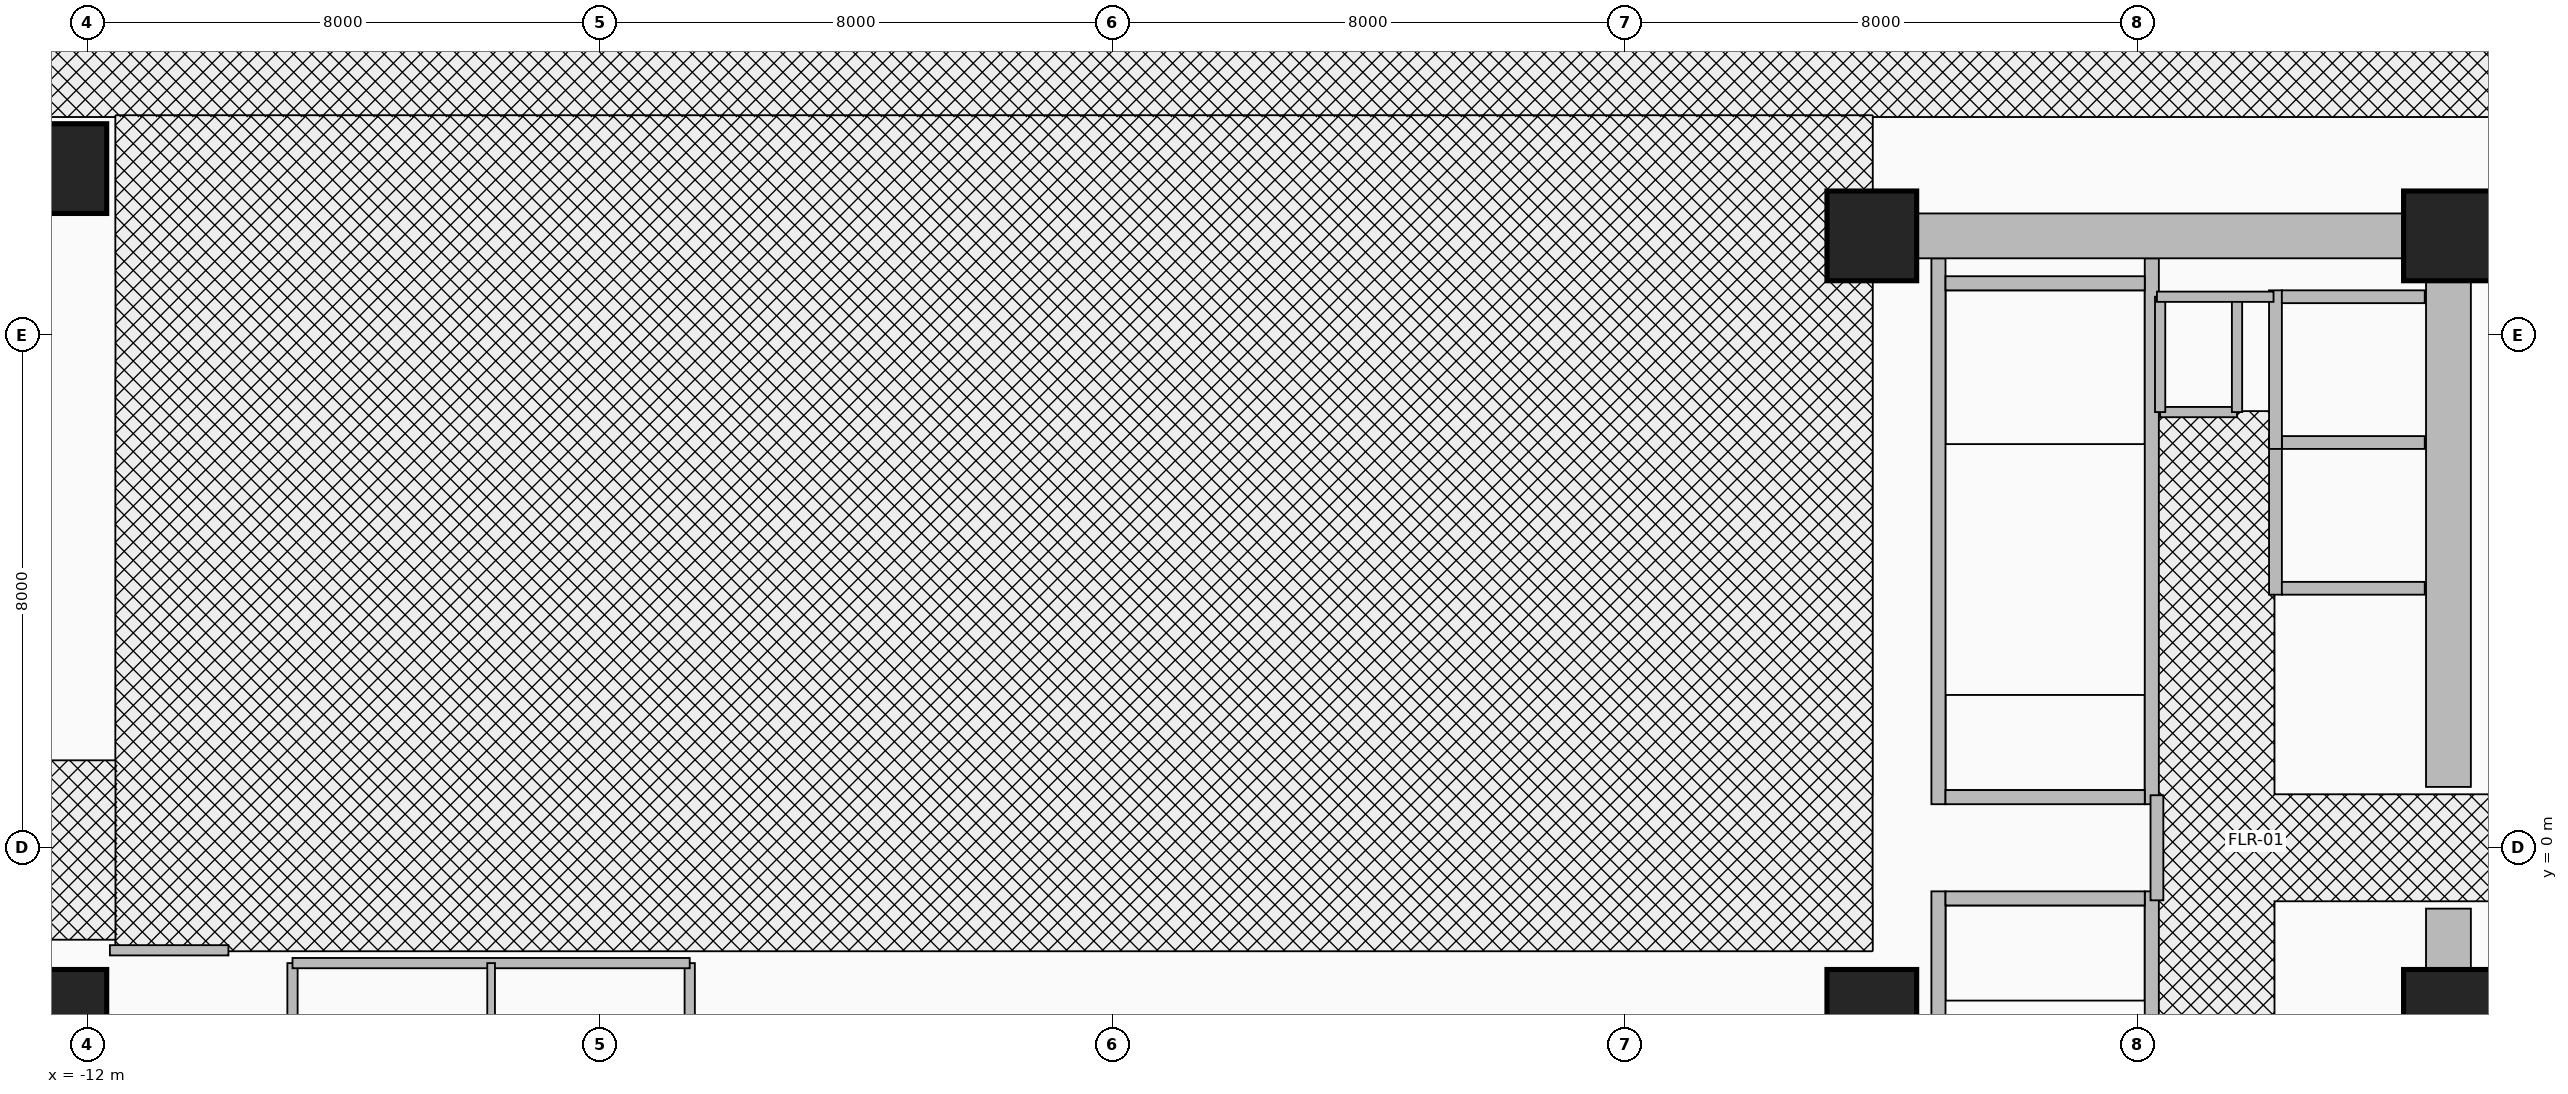
"""IFC4 building model, lengths in metres.
Left out: names, types, materials, properties, quantities, classifications, styles, units other than length and angle.
Written with IfcOpenShell. Run it as: python <this file> out.ifc"""

import sys

from ifc_helpers import new_model, si_unit, direction, frame, frame_2d, origin, origin_2d, place, context, subcontext, project, spatial, rectangle, extrude, source, transform, mapped, element, fill, save


model = new_model("IFC4")
c1 = context("Model", 3, precision=1e-05, world=origin(), true_north=direction((0.0, 1.0)))
c2 = subcontext(c1, "Body", "Model", "MODEL_VIEW")
j1 = project(units=[si_unit("LENGTHUNIT", "METRE"), si_unit("PLANEANGLEUNIT", "RADIAN")], contexts=[c1])
p1 = place(None, origin())
s1 = spatial("IfcSite", under=j1, at=p1, CompositionType="ELEMENT")
p2 = place(p1, origin())
s2 = spatial("IfcBuilding", under=s1, at=p2, CompositionType="ELEMENT")
p3 = place(p2, frame((0.0, 0.0, 5.2)))
s3 = spatial("IfcBuildingStorey", under=s2, at=p3, CompositionType="ELEMENT", Elevation=5.2)
for number, where, z_axis, x_axis in (
    (1, (16.89, 0.68, 0.0), (0.0, 0.0, 1.0), (0.0, 1.0, 0.0)),
    (2, (20.22, 0.68, 0.0), (0.0, 0.0, 1.0), (0.0, 1.0, 0.0)),
):
    element("IfcWall", number, at=place(p3, frame(where, z_axis=z_axis, x_axis=x_axis)), inside=s3, PredefinedType="SHEAR", context=c2, shape_type="SweptSolid", body=[
        extrude(rectangle(XDim=8.52, YDim=0.22, at=frame_2d((4.26, 0.0))), origin(), (0.0, 0.0, 1.0), 4.92),
    ])
p4 = place(p3, frame((17.0, 0.79, 0.0), z_axis=(0.0, 0.0, 1.0), x_axis=(1.0, 0.0, 0.0)))
e3 = element("IfcWall", 3, at=p4, inside=s3, PredefinedType="SHEAR", context=c2, shape_type="SweptSolid", body=[
    extrude(rectangle(XDim=3.11, YDim=0.22, at=frame_2d((1.555, 0.0))), origin(), (0.0, 0.0, 1.0), 4.92),
])
p5 = place(p4, frame((0.95, 0.0, 0.0)))
e4 = element("IfcOpeningElement", 4, at=p5, cuts=e3, PredefinedType="OPENING", context=c2, shape_type="SweptSolid", body=[
    extrude(rectangle(XDim=1.1, YDim=2.15, at=frame_2d((0.55, 1.075))), frame((0.0, 0.125, 0.0), z_axis=(0.0, -1.0, 0.0), x_axis=(1.0, 0.0, 0.0)), (0.0, 0.0, 1.0), 0.25),
])
p6 = place(p3, frame((17.0, 8.81, 0.0), z_axis=(0.0, 0.0, 1.0), x_axis=(1.0, 0.0, 0.0)))
e5 = element("IfcWall", 5, at=p6, inside=s3, PredefinedType="SHEAR", context=c2, shape_type="SweptSolid", body=[
    extrude(rectangle(XDim=3.11, YDim=0.22, at=frame_2d((1.555, 0.0))), origin(), (0.0, 0.0, 1.0), 4.92),
])
for number, where, z_axis, x_axis in (
    (6, (16.89, -9.2, 0.0), (0.0, 0.0, 1.0), (0.0, 1.0, 0.0)),
    (7, (20.22, -9.2, 0.0), (0.0, 0.0, 1.0), (0.0, 1.0, 0.0)),
):
    element("IfcWall", number, at=place(p3, frame(where, z_axis=z_axis, x_axis=x_axis)), inside=s3, PredefinedType="SHEAR", context=c2, shape_type="SweptSolid", body=[
        extrude(rectangle(XDim=8.52, YDim=0.22, at=frame_2d((4.26, 0.0))), origin(), (0.0, 0.0, 1.0), 4.92),
    ])
p7 = place(p3, frame((17.0, -0.79, 0.0), z_axis=(0.0, 0.0, 1.0), x_axis=(1.0, 0.0, 0.0)))
e8 = element("IfcWall", 8, at=p7, inside=s3, PredefinedType="SHEAR", context=c2, shape_type="SweptSolid", body=[
    extrude(rectangle(XDim=3.11, YDim=0.22, at=frame_2d((1.555, 0.0))), origin(), (0.0, 0.0, 1.0), 4.92),
])
p8 = place(p7, frame((0.95, 0.0, 0.0)))
e9 = element("IfcOpeningElement", 9, at=p8, cuts=e8, PredefinedType="OPENING", context=c2, shape_type="SweptSolid", body=[
    extrude(rectangle(XDim=1.1, YDim=2.15, at=frame_2d((0.55, 1.075))), frame((0.0, 0.125, 0.0), z_axis=(0.0, -1.0, 0.0), x_axis=(1.0, 0.0, 0.0)), (0.0, 0.0, 1.0), 0.25),
])
p9 = place(p3, frame((-22.65, 10.8, 0.0), z_axis=(0.0, 0.0, 1.0), x_axis=(1.0, 0.0, 0.0)))
e10 = element("IfcWall", 10, at=p9, inside=s3, PredefinedType="SHEAR", context=c2, shape_type="SweptSolid", body=[
    extrude(rectangle(XDim=10.25, YDim=0.7, at=frame_2d((5.125, 0.0))), origin(), (0.0, 0.0, 1.0), 4.92),
])
for number, where, z_axis, x_axis in (
    (11, (24.85, -9.9, 0.0), (0.0, 0.0, 1.0), (0.0, 1.0, 0.0)),
    (12, (24.85, 0.95, 0.0), (0.0, 0.0, 1.0), (0.0, 1.0, 0.0)),
):
    element("IfcWall", number, at=place(p3, frame(where, z_axis=z_axis, x_axis=x_axis)), inside=s3, PredefinedType="SHEAR", context=c2, shape_type="SweptSolid", body=[
        extrude(rectangle(XDim=8.95, YDim=0.7, at=frame_2d((4.475, 0.0))), origin(), (0.0, 0.0, 1.0), 4.92),
    ])
p10 = place(p3, frame((15.85, 9.55, 0.0), z_axis=(0.0, 0.0, 1.0), x_axis=(1.0, 0.0, 0.0)))
e13 = element("IfcWall", 13, at=p10, inside=s3, PredefinedType="SHEAR", context=c2, shape_type="SweptSolid", body=[
    extrude(rectangle(XDim=9.0, YDim=0.7, at=frame_2d((4.5, 0.0))), origin(), (0.0, 0.0, 1.0), 4.92),
])
m1 = source(origin(), c2, "Body", "SweptSolid", [
    extrude(rectangle(XDim=1.4, YDim=1.4, at=origin_2d()), origin(), (0.0, 0.0, 1.0), 5.2),
])
for number, where, z_axis, x_axis in (
    (14, (-12.4, -2.6, 0.0), (0.0, 0.0, 1.0), (1.0, 0.0, 0.0)),
    (15, (-12.4, 10.6, 0.0), (0.0, 0.0, 1.0), (1.0, 0.0, 0.0)),
    (16, (15.85, -2.6, 0.0), (0.0, 0.0, 1.0), (1.0, 0.0, 0.0)),
    (17, (24.85, -2.6, 0.0), (0.0, 0.0, 1.0), (1.0, 0.0, 0.0)),
    (18, (15.85, 9.55, 0.0), (0.0, 0.0, 1.0), (1.0, 0.0, 0.0)),
    (19, (24.85, 9.55, 0.0), (0.0, 0.0, 1.0), (1.0, 0.0, 0.0)),
):
    element("IfcColumn", number, at=place(p3, frame(where, z_axis=z_axis, x_axis=x_axis)), inside=s3, PredefinedType="COLUMN", context=c2, shape_type="MappedRepresentation", body=[
        mapped(m1, transform((0.0, 0.0, 0.0), x_axis=(1.0, 0.0, 0.0), y_axis=(0.0, 1.0, 0.0), z_axis=(0.0, 0.0, 1.0), scale=1.0)),
    ])
p11 = place(p3, frame((22.15, 3.95, 0.0), z_axis=(0.0, 0.0, 1.0), x_axis=(0.0, 1.0, 0.0)))
e20 = element("IfcWall", 20, at=p11, inside=s3, PredefinedType="MOVABLE", context=c2, shape_type="SweptSolid", body=[
    extrude(rectangle(XDim=2.475, YDim=0.2, at=frame_2d((1.238, 0.0))), origin(), (0.0, 0.0, 1.0), 4.92),
])
for number, where, z_axis, x_axis in (
    (21, (22.25, 4.05, 0.0), (0.0, 0.0, 1.0), (1.0, 0.0, 0.0)),
    (22, (22.25, 6.325, 0.0), (0.0, 0.0, 1.0), (1.0, 0.0, 0.0)),
):
    element("IfcWall", number, at=place(p3, frame(where, z_axis=z_axis, x_axis=x_axis)), inside=s3, PredefinedType="MOVABLE", context=c2, shape_type="SweptSolid", body=[
        extrude(rectangle(XDim=2.23, YDim=0.2, at=frame_2d((1.115, 0.0))), origin(), (0.0, 0.0, 1.0), 3.745),
    ])
p12 = place(p3, frame((22.15, 6.225, 0.0), z_axis=(0.0, 0.0, 1.0), x_axis=(0.0, 1.0, 0.0)))
e23 = element("IfcWall", 23, at=p12, inside=s3, PredefinedType="MOVABLE", context=c2, shape_type="SweptSolid", body=[
    extrude(rectangle(XDim=2.475, YDim=0.2, at=frame_2d((1.237, 0.0))), origin(), (0.0, 0.0, 1.0), 4.92),
])
p13 = place(p3, frame((22.25, 8.6, 0.0), z_axis=(0.0, 0.0, 1.0), x_axis=(1.0, 0.0, 0.0)))
e24 = element("IfcWall", 24, at=p13, inside=s3, PredefinedType="MOVABLE", context=c2, shape_type="SweptSolid", body=[
    extrude(rectangle(XDim=2.23, YDim=0.2, at=frame_2d((1.115, 0.0))), origin(), (0.0, 0.0, 1.0), 3.745),
])
p14 = place(p3, frame((20.3, -0.82, 0.0), z_axis=(0.0, 0.0, 1.0), x_axis=(0.0, 1.0, 0.0)))
e25 = element("IfcWall", 25, at=p14, inside=s3, PredefinedType="PARTITIONING", context=c2, shape_type="SweptSolid", body=[
    extrude(rectangle(XDim=1.64, YDim=0.2, at=frame_2d((0.82, 0.0))), origin(), (0.0, 0.0, 1.0), 4.92),
])
p15 = place(p14, frame((0.295, 0.0, 0.0)))
e26 = element("IfcOpeningElement", 26, at=p15, cuts=e25, PredefinedType="OPENING", context=c2, shape_type="SweptSolid", body=[
    extrude(rectangle(XDim=1.05, YDim=2.15, at=frame_2d((0.525, 1.075))), frame((0.0, 0.115, 0.0), z_axis=(0.0, -1.0, 0.0), x_axis=(1.0, 0.0, 0.0)), (0.0, 0.0, 1.0), 0.23),
])
p16 = place(p3, frame((20.35, 6.8, 0.0), z_axis=(0.0, 0.0, 1.0), x_axis=(1.0, 0.0, 0.0)))
e27 = element("IfcWall", 27, at=p16, inside=s3, PredefinedType="PARTITIONING", context=c2, shape_type="SweptSolid", body=[
    extrude(rectangle(XDim=1.2, YDim=0.16, at=frame_2d((0.6, 0.0))), origin(), (0.0, 0.0, 1.0), 4.92),
])
p17 = place(p16, frame((0.175, 0.0, 0.0)))
e28 = element("IfcOpeningElement", 28, at=p17, cuts=e27, PredefinedType="OPENING", context=c2, shape_type="SweptSolid", body=[
    extrude(rectangle(XDim=0.85, YDim=2.05, at=frame_2d((0.425, 1.025))), frame((0.0, 0.095, 0.0), z_axis=(0.0, -1.0, 0.0), x_axis=(1.0, 0.0, 0.0)), (0.0, 0.0, 1.0), 0.19),
])
for number, where, z_axis, x_axis in (
    (29, (21.55, 6.8, 0.0), (0.0, 0.0, 1.0), (0.0, 1.0, 0.0)),
    (30, (20.35, 6.8, 0.0), (0.0, 0.0, 1.0), (0.0, 1.0, 0.0)),
):
    element("IfcWall", number, at=place(p3, frame(where, z_axis=z_axis, x_axis=x_axis)), inside=s3, PredefinedType="PARTITIONING", context=c2, shape_type="SweptSolid", body=[
        extrude(rectangle(XDim=1.8, YDim=0.16, at=frame_2d((0.9, 0.0))), origin(), (0.0, 0.0, 1.0), 4.92),
    ])
p18 = place(p3, frame((20.3, 8.6, 0.0), z_axis=(0.0, 0.0, 1.0), x_axis=(1.0, 0.0, 0.0)))
e31 = element("IfcWall", 31, at=p18, inside=s3, PredefinedType="PARTITIONING", context=c2, shape_type="SweptSolid", body=[
    extrude(rectangle(XDim=1.82, YDim=0.16, at=frame_2d((0.91, 0.0))), origin(), (0.0, 0.0, 1.0), 4.92),
])
for number, where, z_axis, x_axis in (
    (32, (-8.8, -5.2, 0.0), (0.0, 0.0, 1.0), (0.0, 1.0, 0.0)),
    (33, (-2.6, -5.2, 0.0), (0.0, 0.0, 1.0), (0.0, 1.0, 0.0)),
):
    element("IfcWall", number, at=place(p3, frame(where, z_axis=z_axis, x_axis=x_axis)), inside=s3, PredefinedType="PARTITIONING", context=c2, shape_type="SweptSolid", body=[
        extrude(rectangle(XDim=3.4, YDim=0.16, at=frame_2d((1.7, 0.0))), origin(), (0.0, 0.0, 1.0), 4.92),
    ])
p19 = place(p3, frame((-8.8, -1.8, 0.0), z_axis=(0.0, 0.0, 1.0), x_axis=(1.0, 0.0, 0.0)))
e34 = element("IfcWall", 34, at=p19, inside=s3, PredefinedType="PARTITIONING", context=c2, shape_type="SweptSolid", body=[
    extrude(rectangle(XDim=6.2, YDim=0.16, at=frame_2d((3.1, 0.0))), origin(), (0.0, 0.0, 1.0), 4.92),
])
p20 = place(p19, frame((0.3, 0.0, 0.0)))
e35 = element("IfcOpeningElement", 35, at=p20, cuts=e34, PredefinedType="OPENING", context=c2, shape_type="SweptSolid", body=[
    extrude(rectangle(XDim=0.85, YDim=2.1, at=frame_2d((0.425, 1.05))), frame((0.0, 0.095, 0.0), z_axis=(0.0, -1.0, 0.0), x_axis=(1.0, 0.0, 0.0)), (0.0, 0.0, 1.0), 0.19),
])
p21 = place(p19, frame((3.35, 0.0, 0.0)))
e36 = element("IfcOpeningElement", 36, at=p21, cuts=e34, PredefinedType="OPENING", context=c2, shape_type="SweptSolid", body=[
    extrude(rectangle(XDim=0.85, YDim=2.1, at=frame_2d((0.425, 1.05))), frame((0.0, 0.095, 0.0), z_axis=(0.0, -1.0, 0.0), x_axis=(1.0, 0.0, 0.0)), (0.0, 0.0, 1.0), 0.19),
])
p22 = place(p3, frame((-5.7, -5.2, 0.0), z_axis=(0.0, 0.0, 1.0), x_axis=(0.0, 1.0, 0.0)))
e37 = element("IfcWall", 37, at=p22, inside=s3, PredefinedType="PARTITIONING", context=c2, shape_type="SweptSolid", body=[
    extrude(rectangle(XDim=3.4, YDim=0.12, at=frame_2d((1.7, 0.0))), origin(), (0.0, 0.0, 1.0), 4.92),
])
p23 = place(p3, frame((-11.65, -1.6, 0.0), z_axis=(0.0, 0.0, 1.0), x_axis=(1.0, 0.0, 0.0)))
e38 = element("IfcWall", 38, at=p23, inside=s3, PredefinedType="PARTITIONING", context=c2, shape_type="SweptSolid", body=[
    extrude(rectangle(XDim=1.85, YDim=0.16, at=frame_2d((0.925, 0.0))), origin(), (0.0, 0.0, 1.0), 4.92),
])
p24 = place(p15, origin())
e39 = element("IfcDoor", 39, at=p24, inside=s3, OperationType="SINGLE_SWING_RIGHT", PredefinedType="DOOR", context=c2, shape_type="SweptSolid", body=[
    extrude(rectangle(XDim=1.05, YDim=2.15, at=frame_2d((0.525, 1.075))), frame((0.0, 0.025, 0.0), z_axis=(0.0, -1.0, 0.0), x_axis=(1.0, 0.0, 0.0)), (0.0, 0.0, 1.0), 0.05),
])
fill(e26, e39)
p25 = place(p5, frame((1.1, 0.0, 0.0), z_axis=(0.0, 0.0, 1.0), x_axis=(-1.0, 0.0, 0.0)))
e40 = element("IfcDoor", 40, at=p25, inside=s3, OperationType="SINGLE_SWING_LEFT", PredefinedType="DOOR", context=c2, shape_type="SweptSolid", body=[
    extrude(rectangle(XDim=1.1, YDim=2.15, at=frame_2d((0.55, 1.075))), frame((0.0, 0.025, 0.0), z_axis=(0.0, -1.0, 0.0), x_axis=(1.0, 0.0, 0.0)), (0.0, 0.0, 1.0), 0.05),
])
fill(e4, e40)
p26 = place(p8, origin())
e41 = element("IfcDoor", 41, at=p26, inside=s3, OperationType="SINGLE_SWING_RIGHT", PredefinedType="DOOR", context=c2, shape_type="SweptSolid", body=[
    extrude(rectangle(XDim=1.1, YDim=2.15, at=frame_2d((0.55, 1.075))), frame((0.0, 0.025, 0.0), z_axis=(0.0, -1.0, 0.0), x_axis=(1.0, 0.0, 0.0)), (0.0, 0.0, 1.0), 0.05),
])
fill(e9, e41)
p27 = place(p17, origin())
e42 = element("IfcDoor", 42, at=p27, inside=s3, OperationType="SINGLE_SWING_LEFT", PredefinedType="DOOR", context=c2, shape_type="SweptSolid", body=[
    extrude(rectangle(XDim=0.85, YDim=2.05, at=frame_2d((0.425, 1.025))), frame((0.0, 0.025, 0.0), z_axis=(0.0, -1.0, 0.0), x_axis=(1.0, 0.0, 0.0)), (0.0, 0.0, 1.0), 0.05),
])
fill(e28, e42)
p28 = place(p20, origin())
e43 = element("IfcDoor", 43, at=p28, inside=s3, OperationType="SINGLE_SWING_RIGHT", PredefinedType="DOOR", context=c2, shape_type="SweptSolid", body=[
    extrude(rectangle(XDim=0.85, YDim=2.1, at=frame_2d((0.425, 1.05))), frame((0.0, 0.025, 0.0), z_axis=(0.0, -1.0, 0.0), x_axis=(1.0, 0.0, 0.0)), (0.0, 0.0, 1.0), 0.05),
])
fill(e35, e43)
p29 = place(p21, origin())
e44 = element("IfcDoor", 44, at=p29, inside=s3, OperationType="SINGLE_SWING_LEFT", PredefinedType="DOOR", context=c2, shape_type="SweptSolid", body=[
    extrude(rectangle(XDim=0.85, YDim=2.1, at=frame_2d((0.425, 1.05))), frame((0.0, 0.025, 0.0), z_axis=(0.0, -1.0, 0.0), x_axis=(1.0, 0.0, 0.0)), (0.0, 0.0, 1.0), 0.05),
])
fill(e36, e44)
save(model, sys.argv[1])
